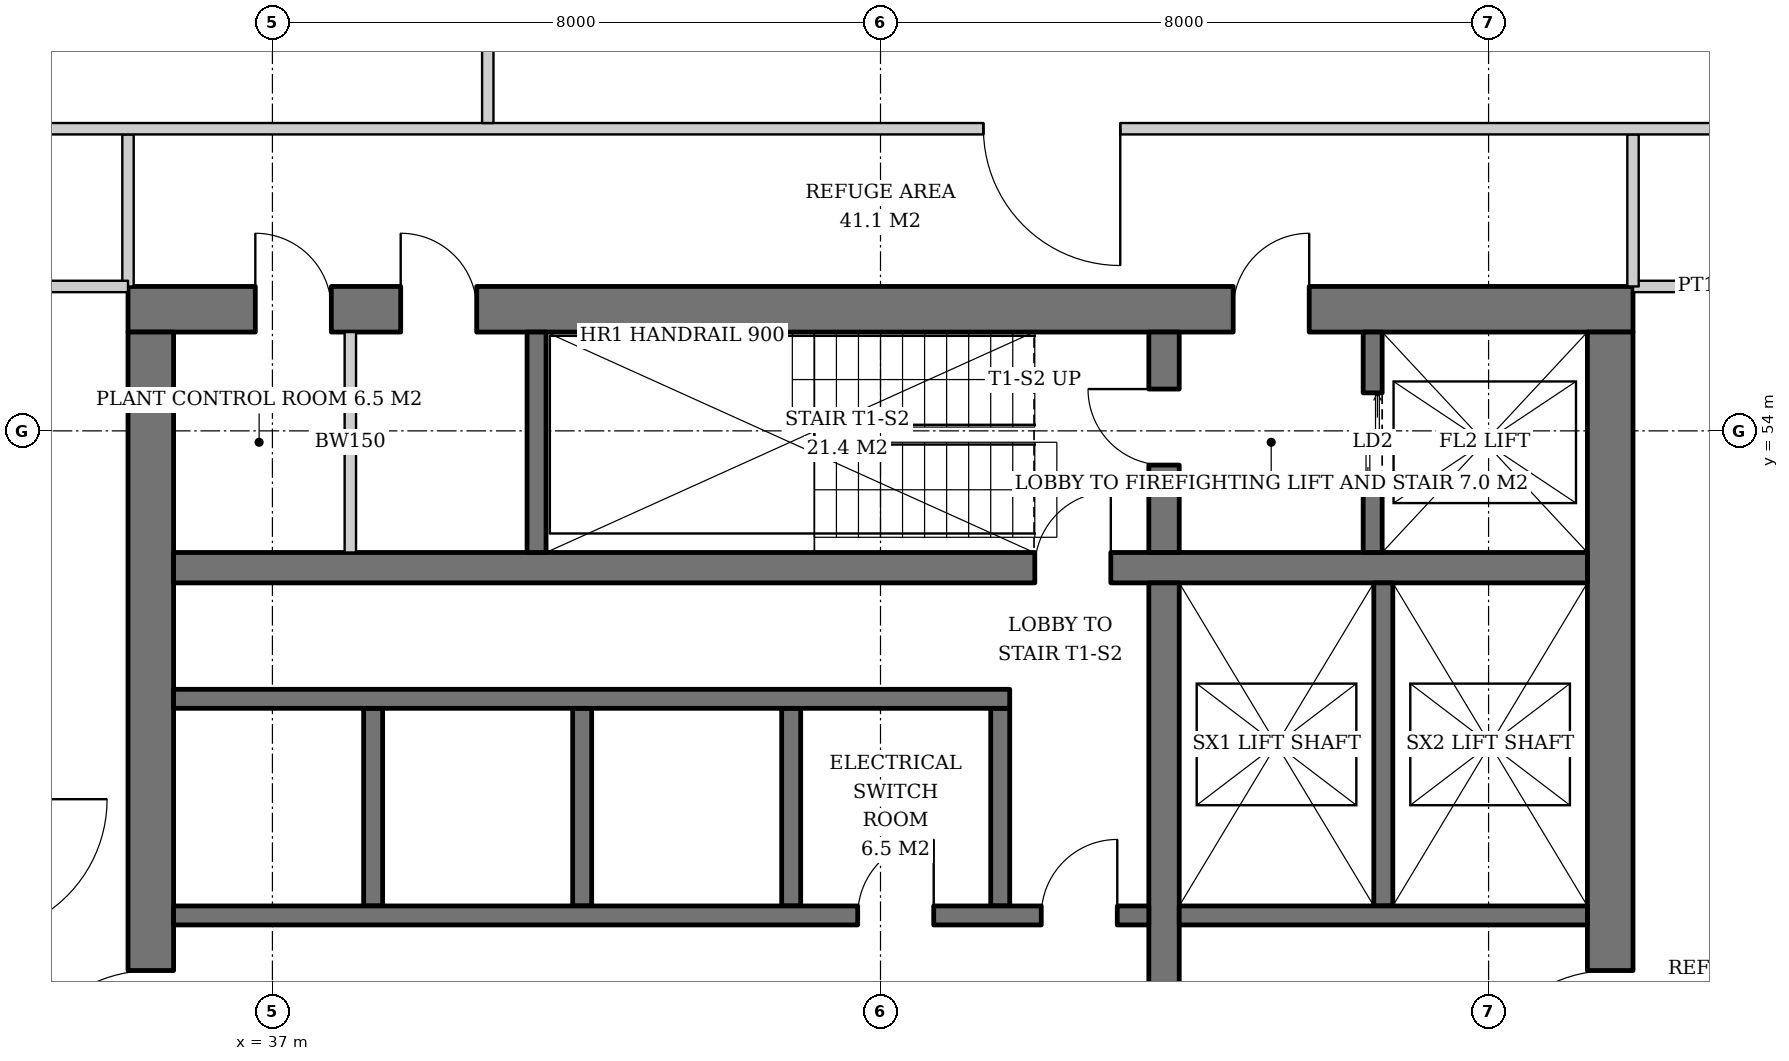
"""IFC4 building model, lengths in metres.
Left out: names, types, materials, properties, quantities, classifications, styles, units other than length and angle.
Written with IfcOpenShell. Run it as: python <this file> out.ifc"""

import sys

from ifc_helpers import new_model, si_unit, direction, frame, frame_2d, origin, place, context, subcontext, project, spatial, rectangle, extrude, element, fill, save


model = new_model("IFC4")
c1 = context("Model", 3, precision=1e-05, world=origin(), true_north=direction((0.0, 1.0)))
c2 = subcontext(c1, "Body", "Model", "MODEL_VIEW")
j1 = project(units=[si_unit("LENGTHUNIT", "METRE"), si_unit("PLANEANGLEUNIT", "RADIAN")], contexts=[c1])
p1 = place(None, origin())
s1 = spatial("IfcSite", under=j1, at=p1, CompositionType="ELEMENT")
p2 = place(p1, origin())
s2 = spatial("IfcBuilding", under=s1, at=p2, CompositionType="ELEMENT")
p3 = place(p2, frame((0.0, 0.0, 230.0)))
s3 = spatial("IfcBuildingStorey", under=s2, at=p3, CompositionType="ELEMENT", Elevation=230.0)
p4 = place(p3, frame((35.1, 55.6, 0.0), z_axis=(0.0, 0.0, 1.0), x_axis=(1.0, 0.0, 0.0)))
e1 = element("IfcWall", 1, at=p4, inside=s3, PredefinedType="SHEAR", context=c2, shape_type="SweptSolid", body=[
    extrude(rectangle(XDim=19.8, YDim=0.6, at=frame_2d((9.9, 0.0))), origin(), (0.0, 0.0, 1.0), 3.8),
])
p5 = place(p4, frame((14.54, 0.0, 0.0)))
e2 = element("IfcOpeningElement", 2, at=p5, cuts=e1, PredefinedType="OPENING", context=c2, shape_type="SweptSolid", body=[
    extrude(rectangle(XDim=1.0, YDim=2.1, at=frame_2d((0.5, 1.05))), frame((0.0, 0.31, 0.0), z_axis=(0.0, -1.0, 0.0), x_axis=(1.0, 0.0, 0.0)), (0.0, 0.0, 1.0), 0.62),
])
p6 = place(p4, frame((1.675, 0.0, 0.0)))
e3 = element("IfcOpeningElement", 3, at=p6, cuts=e1, PredefinedType="OPENING", context=c2, shape_type="SweptSolid", body=[
    extrude(rectangle(XDim=1.0, YDim=2.1, at=frame_2d((0.5, 1.05))), frame((0.0, 0.31, 0.0), z_axis=(0.0, -1.0, 0.0), x_axis=(1.0, 0.0, 0.0)), (0.0, 0.0, 1.0), 0.62),
])
p7 = place(p4, frame((3.587, 0.0, 0.0)))
e4 = element("IfcOpeningElement", 4, at=p7, cuts=e1, PredefinedType="OPENING", context=c2, shape_type="SweptSolid", body=[
    extrude(rectangle(XDim=1.0, YDim=2.1, at=frame_2d((0.5, 1.05))), frame((0.0, 0.31, 0.0), z_axis=(0.0, -1.0, 0.0), x_axis=(1.0, 0.0, 0.0)), (0.0, 0.0, 1.0), 0.62),
])
p8 = place(p3, frame((35.4, 36.7, 0.0), z_axis=(0.0, 0.0, 1.0), x_axis=(0.0, 1.0, 0.0)))
e5 = element("IfcWall", 5, at=p8, inside=s3, PredefinedType="SHEAR", context=c2, shape_type="SweptSolid", body=[
    extrude(rectangle(XDim=18.6, YDim=0.6, at=frame_2d((9.3, 0.0))), origin(), (0.0, 0.0, 1.0), 3.8),
])
p9 = place(p8, frame((8.4, 0.0, 0.0)))
e6 = element("IfcOpeningElement", 6, at=p9, cuts=e5, PredefinedType="OPENING", context=c2, shape_type="SweptSolid", body=[
    extrude(rectangle(XDim=1.8, YDim=2.4, at=frame_2d((0.9, 1.2))), frame((0.0, 0.31, 0.0), z_axis=(0.0, -1.0, 0.0), x_axis=(1.0, 0.0, 0.0)), (0.0, 0.0, 1.0), 0.62),
])
p10 = place(p3, frame((54.6, 36.7, 0.0), z_axis=(0.0, 0.0, 1.0), x_axis=(0.0, 1.0, 0.0)))
e7 = element("IfcWall", 7, at=p10, inside=s3, PredefinedType="SHEAR", context=c2, shape_type="SweptSolid", body=[
    extrude(rectangle(XDim=18.6, YDim=0.6, at=frame_2d((9.3, 0.0))), origin(), (0.0, 0.0, 1.0), 3.8),
])
p11 = place(p10, frame((8.4, 0.0, 0.0)))
e8 = element("IfcOpeningElement", 8, at=p11, cuts=e7, PredefinedType="OPENING", context=c2, shape_type="SweptSolid", body=[
    extrude(rectangle(XDim=1.8, YDim=2.4, at=frame_2d((0.9, 1.2))), frame((0.0, 0.31, 0.0), z_axis=(0.0, -1.0, 0.0), x_axis=(1.0, 0.0, 0.0)), (0.0, 0.0, 1.0), 0.62),
])
p12 = place(p3, frame((35.7, 52.2, 0.0), z_axis=(0.0, 0.0, 1.0), x_axis=(1.0, 0.0, 0.0)))
e9 = element("IfcWall", 9, at=p12, inside=s3, PredefinedType="SHEAR", context=c2, shape_type="SweptSolid", body=[
    extrude(rectangle(XDim=18.6, YDim=0.4, at=frame_2d((9.3, 0.0))), origin(), (0.0, 0.0, 1.0), 3.8),
])
p13 = place(p12, frame((11.33, 0.0, 0.0)))
e10 = element("IfcOpeningElement", 10, at=p13, cuts=e9, PredefinedType="OPENING", context=c2, shape_type="SweptSolid", body=[
    extrude(rectangle(XDim=1.0, YDim=2.1, at=frame_2d((0.5, 1.05))), frame((0.0, 0.21, 0.0), z_axis=(0.0, -1.0, 0.0), x_axis=(1.0, 0.0, 0.0)), (0.0, 0.0, 1.0), 0.42),
])
p14 = place(p3, frame((48.73, 40.0, 0.0), z_axis=(0.0, 0.0, 1.0), x_axis=(0.0, 1.0, 0.0)))
e11 = element("IfcWall", 11, at=p14, inside=s3, PredefinedType="SHEAR", context=c2, shape_type="SweptSolid", body=[
    extrude(rectangle(XDim=12.0, YDim=0.4, at=frame_2d((6.0, 0.0))), origin(), (0.0, 0.0, 1.0), 3.8),
])
p15 = place(p14, frame((5.5, 0.0, 0.0)))
e12 = element("IfcOpeningElement", 12, at=p15, cuts=e11, PredefinedType="OPENING", context=c2, shape_type="SweptSolid", body=[
    extrude(rectangle(XDim=1.0, YDim=2.1, at=frame_2d((0.5, 1.05))), frame((0.0, 0.21, 0.0), z_axis=(0.0, -1.0, 0.0), x_axis=(1.0, 0.0, 0.0)), (0.0, 0.0, 1.0), 0.42),
])
p16 = place(p3, frame((48.73, 52.4, 0.0), z_axis=(0.0, 0.0, 1.0), x_axis=(0.0, 1.0, 0.0)))
e13 = element("IfcWall", 13, at=p16, inside=s3, PredefinedType="SHEAR", context=c2, shape_type="SweptSolid", body=[
    extrude(rectangle(XDim=2.9, YDim=0.4, at=frame_2d((1.45, 0.0))), origin(), (0.0, 0.0, 1.0), 3.8),
])
p17 = place(p16, frame((1.15, 0.0, 0.0)))
e14 = element("IfcOpeningElement", 14, at=p17, cuts=e13, PredefinedType="OPENING", context=c2, shape_type="SweptSolid", body=[
    extrude(rectangle(XDim=1.0, YDim=2.1, at=frame_2d((0.5, 1.05))), frame((0.0, 0.21, 0.0), z_axis=(0.0, -1.0, 0.0), x_axis=(1.0, 0.0, 0.0)), (0.0, 0.0, 1.0), 0.42),
])
p18 = place(p3, frame((40.475, 52.4, 0.0), z_axis=(0.0, 0.0, 1.0), x_axis=(0.0, 1.0, 0.0)))
e15 = element("IfcWall", 15, at=p18, inside=s3, PredefinedType="SHEAR", context=c2, shape_type="SweptSolid", body=[
    extrude(rectangle(XDim=2.9, YDim=0.25, at=frame_2d((1.45, 0.0))), origin(), (0.0, 0.0, 1.0), 3.8),
])
p19 = place(p3, frame((51.475, 52.4, 0.0), z_axis=(0.0, 0.0, 1.0), x_axis=(0.0, 1.0, 0.0)))
e16 = element("IfcWall", 16, at=p19, inside=s3, PredefinedType="SHEAR", context=c2, shape_type="SweptSolid", body=[
    extrude(rectangle(XDim=2.9, YDim=0.25, at=frame_2d((1.45, 0.0))), origin(), (0.0, 0.0, 1.0), 3.8),
])
p20 = place(p19, frame((0.8, 0.0, 0.0)))
e17 = element("IfcOpeningElement", 17, at=p20, cuts=e16, PredefinedType="OPENING", context=c2, shape_type="SweptSolid", body=[
    extrude(rectangle(XDim=1.3, YDim=2.2, at=frame_2d((0.65, 1.1))), frame((0.0, 0.135, 0.0), z_axis=(0.0, -1.0, 0.0), x_axis=(1.0, 0.0, 0.0)), (0.0, 0.0, 1.0), 0.27),
])
for number, where, z_axis, x_axis in (
    (18, (38.325, 47.75, 0.0), (0.0, 0.0, 1.0), (0.0, 1.0, 0.0)),
    (19, (41.075, 47.75, 0.0), (0.0, 0.0, 1.0), (0.0, 1.0, 0.0)),
    (20, (43.825, 47.75, 0.0), (0.0, 0.0, 1.0), (0.0, 1.0, 0.0)),
    (21, (46.575, 47.75, 0.0), (0.0, 0.0, 1.0), (0.0, 1.0, 0.0)),
):
    element("IfcWall", number, at=place(p3, frame(where, z_axis=z_axis, x_axis=x_axis)), inside=s3, PredefinedType="SHEAR", context=c2, shape_type="SweptSolid", body=[
        extrude(rectangle(XDim=2.6, YDim=0.25, at=frame_2d((1.3, 0.0))), origin(), (0.0, 0.0, 1.0), 3.8),
    ])
p21 = place(p3, frame((35.7, 50.475, 0.0), z_axis=(0.0, 0.0, 1.0), x_axis=(1.0, 0.0, 0.0)))
e22 = element("IfcWall", 22, at=p21, inside=s3, PredefinedType="SHEAR", context=c2, shape_type="SweptSolid", body=[
    extrude(rectangle(XDim=11.0, YDim=0.25, at=frame_2d((5.5, 0.0))), origin(), (0.0, 0.0, 1.0), 3.8),
])
p22 = place(p3, frame((35.7, 47.625, 0.0), z_axis=(0.0, 0.0, 1.0), x_axis=(1.0, 0.0, 0.0)))
e23 = element("IfcWall", 23, at=p22, inside=s3, PredefinedType="SHEAR", context=c2, shape_type="SweptSolid", body=[
    extrude(rectangle(XDim=12.83, YDim=0.25, at=frame_2d((6.415, 0.0))), origin(), (0.0, 0.0, 1.0), 3.8),
])
p23 = place(p22, frame((9.0, 0.0, 0.0)))
e24 = element("IfcOpeningElement", 24, at=p23, cuts=e23, PredefinedType="OPENING", context=c2, shape_type="SweptSolid", body=[
    extrude(rectangle(XDim=1.0, YDim=2.1, at=frame_2d((0.5, 1.05))), frame((0.0, 0.135, 0.0), z_axis=(0.0, -1.0, 0.0), x_axis=(1.0, 0.0, 0.0)), (0.0, 0.0, 1.0), 0.27),
])
p24 = place(p22, frame((11.415, 0.0, 0.0)))
e25 = element("IfcOpeningElement", 25, at=p24, cuts=e23, PredefinedType="OPENING", context=c2, shape_type="SweptSolid", body=[
    extrude(rectangle(XDim=1.0, YDim=2.1, at=frame_2d((0.5, 1.05))), frame((0.0, 0.135, 0.0), z_axis=(0.0, -1.0, 0.0), x_axis=(1.0, 0.0, 0.0)), (0.0, 0.0, 1.0), 0.27),
])
p25 = place(p3, frame((51.615, 47.75, 0.0), z_axis=(0.0, 0.0, 1.0), x_axis=(0.0, 1.0, 0.0)))
e26 = element("IfcWall", 26, at=p25, inside=s3, PredefinedType="SHEAR", context=c2, shape_type="SweptSolid", body=[
    extrude(rectangle(XDim=4.25, YDim=0.25, at=frame_2d((2.125, 0.0))), origin(), (0.0, 0.0, 1.0), 3.8),
])
p26 = place(p3, frame((48.93, 47.625, 0.0), z_axis=(0.0, 0.0, 1.0), x_axis=(1.0, 0.0, 0.0)))
e27 = element("IfcWall", 27, at=p26, inside=s3, PredefinedType="SHEAR", context=c2, shape_type="SweptSolid", body=[
    extrude(rectangle(XDim=5.37, YDim=0.25, at=frame_2d((2.685, 0.0))), origin(), (0.0, 0.0, 1.0), 3.8),
])
p27 = place(p3, frame((38.025, 52.4, 0.0), z_axis=(0.0, 0.0, 1.0), x_axis=(0.0, 1.0, 0.0)))
e28 = element("IfcWall", 28, at=p27, inside=s3, PredefinedType="SOLIDWALL", context=c2, shape_type="SweptSolid", body=[
    extrude(rectangle(XDim=2.9, YDim=0.15, at=frame_2d((1.45, 0.0))), origin(), (0.0, 0.0, 1.0), 3.6),
])
for number, where, z_axis, x_axis in (
    (29, (54.9, 55.9, 0.0), (0.0, 0.0, 1.0), (1.0, 0.0, 0.0)),
    (30, (35.1, 55.9, 0.0), (0.0, 0.0, 1.0), (0.0, 1.0, 0.0)),
    (31, (54.9, 55.9, 0.0), (0.0, 0.0, 1.0), (0.0, 1.0, 0.0)),
):
    element("IfcWall", number, at=place(p3, frame(where, z_axis=z_axis, x_axis=x_axis)), inside=s3, PredefinedType="PARTITIONING", context=c2, shape_type="SweptSolid", body=[
        extrude(rectangle(XDim=2.0, YDim=0.15, at=frame_2d((1.0, 0.0))), origin(), (0.0, 0.0, 1.0), 3.6),
    ])
p28 = place(p3, frame((57.736, 57.975, 0.0), z_axis=(0.0, 0.0, 1.0), x_axis=(-1.0, 0.0, 0.0)))
e32 = element("IfcWall", 32, at=p28, inside=s3, PredefinedType="PARTITIONING", context=c2, shape_type="SweptSolid", body=[
    extrude(rectangle(XDim=24.636, YDim=0.15, at=frame_2d((12.318, 0.0))), origin(), (0.0, 0.0, 1.0), 3.0),
])
p29 = place(p28, frame((9.582, 0.0, 0.0)))
e33 = element("IfcOpeningElement", 33, at=p29, cuts=e32, PredefinedType="OPENING", context=c2, shape_type="SweptSolid", body=[
    extrude(rectangle(XDim=1.8, YDim=2.4, at=frame_2d((0.9, 1.2))), frame((0.0, 0.085, 0.0), z_axis=(0.0, -1.0, 0.0), x_axis=(1.0, 0.0, 0.0)), (0.0, 0.0, 1.0), 0.17),
])
p30 = place(p3, frame((39.833, 58.05, 0.0), z_axis=(0.0, 0.0, 1.0), x_axis=(0.0, 1.0, 0.0)))
e34 = element("IfcWall", 34, at=p30, inside=s3, PredefinedType="PARTITIONING", context=c2, shape_type="SweptSolid", body=[
    extrude(rectangle(XDim=4.584, YDim=0.15, at=frame_2d((2.292, 0.0))), origin(), (0.0, 0.0, 1.0), 3.6),
])
p31 = place(p3, frame((35.1, 55.9, 0.0), z_axis=(0.0, 0.0, 1.0), x_axis=(-1.0, 0.0, 0.0)))
e35 = element("IfcWall", 35, at=p31, inside=s3, PredefinedType="PARTITIONING", context=c2, shape_type="SweptSolid", body=[
    extrude(rectangle(XDim=2.0, YDim=0.15, at=frame_2d((1.0, 0.0))), origin(), (0.0, 0.0, 1.0), 3.6),
])
p32 = place(p20, origin())
e36 = element("IfcDoor", 36, at=p32, inside=s3, OperationType="DOUBLE_DOOR_SLIDING", PredefinedType="DOOR", context=c2, shape_type="SweptSolid", body=[
    extrude(rectangle(XDim=1.3, YDim=2.2, at=frame_2d((0.65, 1.1))), frame((0.0, 0.025, 0.0), z_axis=(0.0, -1.0, 0.0), x_axis=(1.0, 0.0, 0.0)), (0.0, 0.0, 1.0), 0.05),
])
fill(e17, e36)
p33 = place(p23, origin())
e37 = element("IfcDoor", 37, at=p33, inside=s3, OperationType="SINGLE_SWING_RIGHT", PredefinedType="DOOR", context=c2, shape_type="SweptSolid", body=[
    extrude(rectangle(XDim=1.0, YDim=2.1, at=frame_2d((0.5, 1.05))), frame((0.0, 0.025, 0.0), z_axis=(0.0, -1.0, 0.0), x_axis=(1.0, 0.0, 0.0)), (0.0, 0.0, 1.0), 0.05),
])
fill(e24, e37)
p34 = place(p24, origin())
e38 = element("IfcDoor", 38, at=p34, inside=s3, OperationType="SINGLE_SWING_RIGHT", PredefinedType="DOOR", context=c2, shape_type="SweptSolid", body=[
    extrude(rectangle(XDim=1.0, YDim=2.1, at=frame_2d((0.5, 1.05))), frame((0.0, 0.025, 0.0), z_axis=(0.0, -1.0, 0.0), x_axis=(1.0, 0.0, 0.0)), (0.0, 0.0, 1.0), 0.05),
])
fill(e25, e38)
p35 = place(p17, origin())
e39 = element("IfcDoor", 39, at=p35, inside=s3, OperationType="SINGLE_SWING_RIGHT", PredefinedType="DOOR", context=c2, shape_type="SweptSolid", body=[
    extrude(rectangle(XDim=1.0, YDim=2.1, at=frame_2d((0.5, 1.05))), frame((0.0, 0.025, 0.0), z_axis=(0.0, -1.0, 0.0), x_axis=(1.0, 0.0, 0.0)), (0.0, 0.0, 1.0), 0.05),
])
fill(e14, e39)
p36 = place(p5, origin())
e40 = element("IfcDoor", 40, at=p36, inside=s3, OperationType="SINGLE_SWING_RIGHT", PredefinedType="DOOR", context=c2, shape_type="SweptSolid", body=[
    extrude(rectangle(XDim=1.0, YDim=2.1, at=frame_2d((0.5, 1.05))), frame((0.0, 0.025, 0.0), z_axis=(0.0, -1.0, 0.0), x_axis=(1.0, 0.0, 0.0)), (0.0, 0.0, 1.0), 0.05),
])
fill(e2, e40)
p37 = place(p9, origin())
e41 = element("IfcDoor", 41, at=p37, inside=s3, OperationType="DOUBLE_DOOR_SINGLE_SWING", PredefinedType="DOOR", context=c2, shape_type="SweptSolid", body=[
    extrude(rectangle(XDim=1.8, YDim=2.4, at=frame_2d((0.9, 1.2))), frame((0.0, 0.025, 0.0), z_axis=(0.0, -1.0, 0.0), x_axis=(1.0, 0.0, 0.0)), (0.0, 0.0, 1.0), 0.05),
])
fill(e6, e41)
p38 = place(p11, origin())
e42 = element("IfcDoor", 42, at=p38, inside=s3, OperationType="DOUBLE_DOOR_SINGLE_SWING", PredefinedType="DOOR", context=c2, shape_type="SweptSolid", body=[
    extrude(rectangle(XDim=1.8, YDim=2.4, at=frame_2d((0.9, 1.2))), frame((0.0, 0.025, 0.0), z_axis=(0.0, -1.0, 0.0), x_axis=(1.0, 0.0, 0.0)), (0.0, 0.0, 1.0), 0.05),
])
fill(e8, e42)
p39 = place(p13, origin())
e43 = element("IfcDoor", 43, at=p39, inside=s3, OperationType="SINGLE_SWING_RIGHT", PredefinedType="DOOR", context=c2, shape_type="SweptSolid", body=[
    extrude(rectangle(XDim=1.0, YDim=2.1, at=frame_2d((0.5, 1.05))), frame((0.0, 0.025, 0.0), z_axis=(0.0, -1.0, 0.0), x_axis=(1.0, 0.0, 0.0)), (0.0, 0.0, 1.0), 0.05),
])
fill(e10, e43)
p40 = place(p6, origin())
e44 = element("IfcDoor", 44, at=p40, inside=s3, OperationType="SINGLE_SWING_LEFT", PredefinedType="DOOR", context=c2, shape_type="SweptSolid", body=[
    extrude(rectangle(XDim=1.0, YDim=2.1, at=frame_2d((0.5, 1.05))), frame((0.0, -0.24, 0.0), z_axis=(0.0, -1.0, 0.0), x_axis=(1.0, 0.0, 0.0)), (0.0, 0.0, 1.0), 0.05),
])
fill(e3, e44)
p41 = place(p7, origin())
e45 = element("IfcDoor", 45, at=p41, inside=s3, OperationType="SINGLE_SWING_LEFT", PredefinedType="DOOR", context=c2, shape_type="SweptSolid", body=[
    extrude(rectangle(XDim=1.0, YDim=2.1, at=frame_2d((0.5, 1.05))), frame((0.0, -0.24, 0.0), z_axis=(0.0, -1.0, 0.0), x_axis=(1.0, 0.0, 0.0)), (0.0, 0.0, 1.0), 0.05),
])
fill(e4, e45)
p42 = place(p29, origin())
e46 = element("IfcDoor", 46, at=p42, inside=s3, OperationType="DOUBLE_DOOR_SINGLE_SWING", PredefinedType="DOOR", context=c2, shape_type="SweptSolid", body=[
    extrude(rectangle(XDim=1.8, YDim=2.4, at=frame_2d((0.9, 1.2))), frame((0.0, 0.025, 0.0), z_axis=(0.0, -1.0, 0.0), x_axis=(1.0, 0.0, 0.0)), (0.0, 0.0, 1.0), 0.05),
])
fill(e33, e46)
save(model, sys.argv[1])
